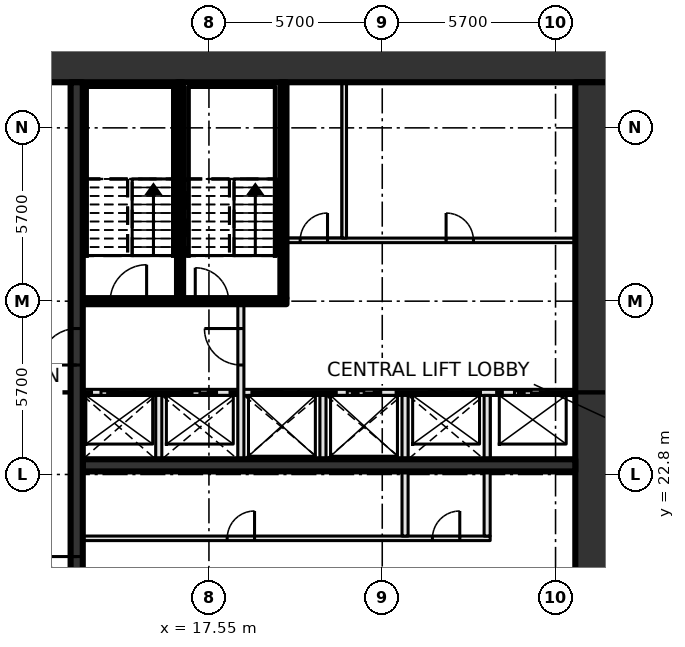
"""IFC4 building model, lengths in metres.
Left out: names, types, materials, properties, quantities, classifications, styles, units other than length and angle.
Written with IfcOpenShell. Run it as: python <this file> out.ifc"""

import sys

from ifc_helpers import new_model, si_unit, direction, frame, frame_2d, origin, place, context, subcontext, project, spatial, rectangle, extrude, element, fill, save


model = new_model("IFC4")
c1 = context("Model", 3, precision=1e-05, world=origin(), true_north=direction((0.0, 1.0)))
c2 = subcontext(c1, "Body", "Model", "MODEL_VIEW")
j1 = project(units=[si_unit("LENGTHUNIT", "METRE"), si_unit("PLANEANGLEUNIT", "RADIAN")], contexts=[c1])
p1 = place(None, origin())
s1 = spatial("IfcSite", under=j1, at=p1, CompositionType="ELEMENT")
p2 = place(p1, origin())
s2 = spatial("IfcBuilding", under=s1, at=p2, CompositionType="ELEMENT")
p3 = place(p2, origin())
s3 = spatial("IfcBuildingStorey", under=s2, at=p3, CompositionType="ELEMENT", Elevation=0.0)
p4 = place(p3, frame((8.0, 36.3, -0.45), z_axis=(0.0, 0.0, 1.0), x_axis=(1.0, 0.0, 0.0)))
e1 = element("IfcWall", 1, at=p4, inside=s3, PredefinedType="SHEAR", context=c2, shape_type="SweptSolid", body=[
    extrude(rectangle(XDim=22.8, YDim=1.2, at=frame_2d((11.4, 0.0))), origin(), (0.0, 0.0, 1.0), 7.2),
])
p5 = place(p4, frame((2.3, 0.0, 0.45)))
e2 = element("IfcOpeningElement", 2, at=p5, cuts=e1, PredefinedType="OPENING", context=c2, shape_type="SweptSolid", body=[
    extrude(rectangle(XDim=1.8, YDim=2.1, at=frame_2d((0.9, 1.05))), frame((0.0, 0.61, 0.0), z_axis=(0.0, -1.0, 0.0), x_axis=(1.0, 0.0, 0.0)), (0.0, 0.0, 1.0), 1.22),
])
p6 = place(p3, frame((30.2, 15.3, -0.45), z_axis=(0.0, 0.0, 1.0), x_axis=(0.0, 1.0, 0.0)))
e3 = element("IfcWall", 3, at=p6, inside=s3, PredefinedType="SHEAR", context=c2, shape_type="SweptSolid", body=[
    extrude(rectangle(XDim=20.4, YDim=1.2, at=frame_2d((10.2, 0.0))), origin(), (0.0, 0.0, 1.0), 7.2),
])
p7 = place(p3, frame((13.4, 20.7, 0.0), z_axis=(0.0, 0.0, 1.0), x_axis=(1.0, 0.0, 0.0)))
e4 = element("IfcWall", 4, at=p7, inside=s3, PredefinedType="PARTITIONING", context=c2, shape_type="SweptSolid", body=[
    extrude(rectangle(XDim=13.4, YDim=0.15, at=frame_2d((6.7, 0.0))), origin(), (0.0, 0.0, 1.0), 6.75),
])
p8 = place(p7, frame((4.75, 0.0, 0.0)))
e5 = element("IfcOpeningElement", 5, at=p8, cuts=e4, PredefinedType="OPENING", context=c2, shape_type="SweptSolid", body=[
    extrude(rectangle(XDim=0.9, YDim=2.1, at=frame_2d((0.45, 1.05))), frame((0.0, 0.085, 0.0), z_axis=(0.0, -1.0, 0.0), x_axis=(1.0, 0.0, 0.0)), (0.0, 0.0, 1.0), 0.17),
])
p9 = place(p7, frame((11.5, 0.0, 0.0)))
e6 = element("IfcOpeningElement", 6, at=p9, cuts=e4, PredefinedType="OPENING", context=c2, shape_type="SweptSolid", body=[
    extrude(rectangle(XDim=0.9, YDim=2.1, at=frame_2d((0.45, 1.05))), frame((0.0, 0.085, 0.0), z_axis=(0.0, -1.0, 0.0), x_axis=(1.0, 0.0, 0.0)), (0.0, 0.0, 1.0), 0.17),
])
p10 = place(p3, frame((13.4, 23.1, 0.0), z_axis=(0.0, 0.0, 1.0), x_axis=(1.0, 0.0, 0.0)))
e7 = element("IfcWall", 7, at=p10, inside=s3, PredefinedType="SHEAR", context=c2, shape_type="SweptSolid", body=[
    extrude(rectangle(XDim=16.2, YDim=0.4, at=frame_2d((8.1, 0.0))), origin(), (0.0, 0.0, 1.0), 6.75),
])
p11 = place(p3, frame((13.4, 25.5, 0.0), z_axis=(0.0, 0.0, 1.0), x_axis=(1.0, 0.0, 0.0)))
e8 = element("IfcWall", 8, at=p11, inside=s3, PredefinedType="SOLIDWALL", context=c2, shape_type="SweptSolid", body=[
    extrude(rectangle(XDim=16.2, YDim=0.2, at=frame_2d((8.1, 0.0))), origin(), (0.0, 0.0, 1.0), 6.75),
])
p12 = place(p11, frame((0.6, 0.0, 0.0)))
e9 = element("IfcOpeningElement", 9, at=p12, cuts=e8, PredefinedType="OPENING", context=c2, shape_type="SweptSolid", body=[
    extrude(rectangle(XDim=1.1, YDim=2.1, at=frame_2d((0.55, 1.05))), frame((0.0, 0.11, 0.0), z_axis=(0.0, -1.0, 0.0), x_axis=(1.0, 0.0, 0.0)), (0.0, 0.0, 1.0), 0.22),
])
p13 = place(p11, frame((3.3, 0.0, 0.0)))
e10 = element("IfcOpeningElement", 10, at=p13, cuts=e8, PredefinedType="OPENING", context=c2, shape_type="SweptSolid", body=[
    extrude(rectangle(XDim=1.1, YDim=2.1, at=frame_2d((0.55, 1.05))), frame((0.0, 0.11, 0.0), z_axis=(0.0, -1.0, 0.0), x_axis=(1.0, 0.0, 0.0)), (0.0, 0.0, 1.0), 0.22),
])
p14 = place(p11, frame((6.0, 0.0, 0.0)))
e11 = element("IfcOpeningElement", 11, at=p14, cuts=e8, PredefinedType="OPENING", context=c2, shape_type="SweptSolid", body=[
    extrude(rectangle(XDim=1.1, YDim=2.1, at=frame_2d((0.55, 1.05))), frame((0.0, 0.11, 0.0), z_axis=(0.0, -1.0, 0.0), x_axis=(1.0, 0.0, 0.0)), (0.0, 0.0, 1.0), 0.22),
])
p15 = place(p11, frame((8.7, 0.0, 0.0)))
e12 = element("IfcOpeningElement", 12, at=p15, cuts=e8, PredefinedType="OPENING", context=c2, shape_type="SweptSolid", body=[
    extrude(rectangle(XDim=1.1, YDim=2.1, at=frame_2d((0.55, 1.05))), frame((0.0, 0.11, 0.0), z_axis=(0.0, -1.0, 0.0), x_axis=(1.0, 0.0, 0.0)), (0.0, 0.0, 1.0), 0.22),
])
p16 = place(p11, frame((11.4, 0.0, 0.0)))
e13 = element("IfcOpeningElement", 13, at=p16, cuts=e8, PredefinedType="OPENING", context=c2, shape_type="SweptSolid", body=[
    extrude(rectangle(XDim=1.1, YDim=2.1, at=frame_2d((0.55, 1.05))), frame((0.0, 0.11, 0.0), z_axis=(0.0, -1.0, 0.0), x_axis=(1.0, 0.0, 0.0)), (0.0, 0.0, 1.0), 0.22),
])
p17 = place(p11, frame((14.2, 0.0, 0.0)))
e14 = element("IfcOpeningElement", 14, at=p17, cuts=e8, PredefinedType="OPENING", context=c2, shape_type="SweptSolid", body=[
    extrude(rectangle(XDim=1.1, YDim=2.1, at=frame_2d((0.55, 1.05))), frame((0.0, 0.11, 0.0), z_axis=(0.0, -1.0, 0.0), x_axis=(1.0, 0.0, 0.0)), (0.0, 0.0, 1.0), 0.22),
])
p18 = place(p3, frame((13.4, 28.5, 0.0), z_axis=(0.0, 0.0, 1.0), x_axis=(1.0, 0.0, 0.0)))
e15 = element("IfcWall", 15, at=p18, inside=s3, PredefinedType="SOLIDWALL", context=c2, shape_type="SweptSolid", body=[
    extrude(rectangle(XDim=6.7, YDim=0.2, at=frame_2d((3.35, 0.0))), origin(), (0.0, 0.0, 1.0), 6.75),
])
p19 = place(p18, frame((0.9, 0.0, 0.0)))
e16 = element("IfcOpeningElement", 16, at=p19, cuts=e15, PredefinedType="OPENING", context=c2, shape_type="SweptSolid", body=[
    extrude(rectangle(XDim=1.2, YDim=2.1, at=frame_2d((0.6, 1.05))), frame((0.0, 0.11, 0.0), z_axis=(0.0, -1.0, 0.0), x_axis=(1.0, 0.0, 0.0)), (0.0, 0.0, 1.0), 0.22),
])
p20 = place(p18, frame((3.7, 0.0, 0.0)))
e17 = element("IfcOpeningElement", 17, at=p20, cuts=e15, PredefinedType="OPENING", context=c2, shape_type="SweptSolid", body=[
    extrude(rectangle(XDim=1.1, YDim=2.1, at=frame_2d((0.55, 1.05))), frame((0.0, 0.11, 0.0), z_axis=(0.0, -1.0, 0.0), x_axis=(1.0, 0.0, 0.0)), (0.0, 0.0, 1.0), 0.22),
])
p21 = place(p3, frame((20.1, 30.5, 0.0), z_axis=(0.0, 0.0, 1.0), x_axis=(1.0, 0.0, 0.0)))
e18 = element("IfcWall", 18, at=p21, inside=s3, PredefinedType="PARTITIONING", context=c2, shape_type="SweptSolid", body=[
    extrude(rectangle(XDim=9.5, YDim=0.15, at=frame_2d((4.75, 0.0))), origin(), (0.0, 0.0, 1.0), 6.75),
])
p22 = place(p21, frame((0.45, 0.0, 0.0)))
e19 = element("IfcOpeningElement", 19, at=p22, cuts=e18, PredefinedType="OPENING", context=c2, shape_type="SweptSolid", body=[
    extrude(rectangle(XDim=0.9, YDim=2.1, at=frame_2d((0.45, 1.05))), frame((0.0, 0.085, 0.0), z_axis=(0.0, -1.0, 0.0), x_axis=(1.0, 0.0, 0.0)), (0.0, 0.0, 1.0), 0.17),
])
p23 = place(p21, frame((5.25, 0.0, 0.0)))
e20 = element("IfcOpeningElement", 20, at=p23, cuts=e18, PredefinedType="OPENING", context=c2, shape_type="SweptSolid", body=[
    extrude(rectangle(XDim=0.9, YDim=2.1, at=frame_2d((0.45, 1.05))), frame((0.0, 0.085, 0.0), z_axis=(0.0, -1.0, 0.0), x_axis=(1.0, 0.0, 0.0)), (0.0, 0.0, 1.0), 0.17),
])
p24 = place(p3, frame((13.2, 15.3, 0.0), z_axis=(0.0, 0.0, 1.0), x_axis=(0.0, 1.0, 0.0)))
e21 = element("IfcWall", 21, at=p24, inside=s3, PredefinedType="SHEAR", context=c2, shape_type="SweptSolid", body=[
    extrude(rectangle(XDim=20.4, YDim=0.4, at=frame_2d((10.2, 0.0))), origin(), (0.0, 0.0, 1.0), 6.75),
])
p25 = place(p24, frame((3.0, 0.0, 0.0)))
e22 = element("IfcOpeningElement", 22, at=p25, cuts=e21, PredefinedType="OPENING", context=c2, shape_type="SweptSolid", body=[
    extrude(rectangle(XDim=1.8, YDim=2.1, at=frame_2d((0.9, 1.05))), frame((0.0, 0.21, 0.0), z_axis=(0.0, -1.0, 0.0), x_axis=(1.0, 0.0, 0.0)), (0.0, 0.0, 1.0), 0.42),
])
p26 = place(p24, frame((11.1, 0.0, 0.0)))
e23 = element("IfcOpeningElement", 23, at=p26, cuts=e21, PredefinedType="OPENING", context=c2, shape_type="SweptSolid", body=[
    extrude(rectangle(XDim=1.2, YDim=2.1, at=frame_2d((0.6, 1.05))), frame((0.0, 0.21, 0.0), z_axis=(0.0, -1.0, 0.0), x_axis=(1.0, 0.0, 0.0)), (0.0, 0.0, 1.0), 0.42),
])
p27 = place(p3, frame((15.9, 23.3, 0.0), z_axis=(0.0, 0.0, 1.0), x_axis=(0.0, 1.0, 0.0)))
e24 = element("IfcWall", 24, at=p27, inside=s3, PredefinedType="SOLIDWALL", context=c2, shape_type="SweptSolid", body=[
    extrude(rectangle(XDim=2.1, YDim=0.2, at=frame_2d((1.05, 0.0))), origin(), (0.0, 0.0, 1.0), 6.75),
])
p28 = place(p3, frame((16.6, 28.6, 0.0), z_axis=(0.0, 0.0, 1.0), x_axis=(0.0, 1.0, 0.0)))
e25 = element("IfcWall", 25, at=p28, inside=s3, PredefinedType="SOLIDWALL", context=c2, shape_type="SweptSolid", body=[
    extrude(rectangle(XDim=7.1, YDim=0.2, at=frame_2d((3.55, 0.0))), origin(), (0.0, 0.0, 1.0), 6.75),
])
p29 = place(p3, frame((18.6, 23.3, 0.0), z_axis=(0.0, 0.0, 1.0), x_axis=(0.0, 1.0, 0.0)))
e26 = element("IfcWall", 26, at=p29, inside=s3, PredefinedType="SOLIDWALL", context=c2, shape_type="SweptSolid", body=[
    extrude(rectangle(XDim=5.1, YDim=0.2, at=frame_2d((2.55, 0.0))), origin(), (0.0, 0.0, 1.0), 6.75),
])
p30 = place(p29, frame((3.1, 0.0, 0.0)))
e27 = element("IfcOpeningElement", 27, at=p30, cuts=e26, PredefinedType="OPENING", context=c2, shape_type="SweptSolid", body=[
    extrude(rectangle(XDim=1.2, YDim=2.1, at=frame_2d((0.6, 1.05))), frame((0.0, 0.11, 0.0), z_axis=(0.0, -1.0, 0.0), x_axis=(1.0, 0.0, 0.0)), (0.0, 0.0, 1.0), 0.22),
])
p31 = place(p3, frame((20.0, 28.6, 0.0), z_axis=(0.0, 0.0, 1.0), x_axis=(0.0, 1.0, 0.0)))
e28 = element("IfcWall", 28, at=p31, inside=s3, PredefinedType="SOLIDWALL", context=c2, shape_type="SweptSolid", body=[
    extrude(rectangle(XDim=7.1, YDim=0.2, at=frame_2d((3.55, 0.0))), origin(), (0.0, 0.0, 1.0), 6.75),
])
p32 = place(p3, frame((21.3, 23.3, 0.0), z_axis=(0.0, 0.0, 1.0), x_axis=(0.0, 1.0, 0.0)))
e29 = element("IfcWall", 29, at=p32, inside=s3, PredefinedType="SOLIDWALL", context=c2, shape_type="SweptSolid", body=[
    extrude(rectangle(XDim=2.1, YDim=0.2, at=frame_2d((1.05, 0.0))), origin(), (0.0, 0.0, 1.0), 6.75),
])
p33 = place(p3, frame((22.0, 30.575, 0.0), z_axis=(0.0, 0.0, 1.0), x_axis=(0.0, 1.0, 0.0)))
e30 = element("IfcWall", 30, at=p33, inside=s3, PredefinedType="PARTITIONING", context=c2, shape_type="SweptSolid", body=[
    extrude(rectangle(XDim=5.125, YDim=0.15, at=frame_2d((2.562, 0.0))), origin(), (0.0, 0.0, 1.0), 6.75),
])
for number, where, z_axis, x_axis in (
    (31, (24.0, 20.775, 0.0), (0.0, 0.0, 1.0), (0.0, 1.0, 0.0)),
    (32, (26.7, 20.775, 0.0), (0.0, 0.0, 1.0), (0.0, 1.0, 0.0)),
):
    element("IfcWall", number, at=place(p3, frame(where, z_axis=z_axis, x_axis=x_axis)), inside=s3, PredefinedType="SOLIDWALL", context=c2, shape_type="SweptSolid", body=[
        extrude(rectangle(XDim=4.625, YDim=0.2, at=frame_2d((2.312, 0.0))), origin(), (0.0, 0.0, 1.0), 6.75),
    ])
p34 = place(p12, origin())
e33 = element("IfcDoor", 33, at=p34, inside=s3, OperationType="SLIDING_TO_LEFT", PredefinedType="DOOR", context=c2, shape_type="SweptSolid", body=[
    extrude(rectangle(XDim=1.1, YDim=2.1, at=frame_2d((0.55, 1.05))), frame((0.0, 0.025, 0.0), z_axis=(0.0, -1.0, 0.0), x_axis=(1.0, 0.0, 0.0)), (0.0, 0.0, 1.0), 0.05),
])
fill(e9, e33)
p35 = place(p13, origin())
e34 = element("IfcDoor", 34, at=p35, inside=s3, OperationType="SLIDING_TO_LEFT", PredefinedType="DOOR", context=c2, shape_type="SweptSolid", body=[
    extrude(rectangle(XDim=1.1, YDim=2.1, at=frame_2d((0.55, 1.05))), frame((0.0, 0.025, 0.0), z_axis=(0.0, -1.0, 0.0), x_axis=(1.0, 0.0, 0.0)), (0.0, 0.0, 1.0), 0.05),
])
fill(e10, e34)
p36 = place(p14, origin())
e35 = element("IfcDoor", 35, at=p36, inside=s3, OperationType="SLIDING_TO_LEFT", PredefinedType="DOOR", context=c2, shape_type="SweptSolid", body=[
    extrude(rectangle(XDim=1.1, YDim=2.1, at=frame_2d((0.55, 1.05))), frame((0.0, 0.025, 0.0), z_axis=(0.0, -1.0, 0.0), x_axis=(1.0, 0.0, 0.0)), (0.0, 0.0, 1.0), 0.05),
])
fill(e11, e35)
p37 = place(p15, origin())
e36 = element("IfcDoor", 36, at=p37, inside=s3, OperationType="SLIDING_TO_LEFT", PredefinedType="DOOR", context=c2, shape_type="SweptSolid", body=[
    extrude(rectangle(XDim=1.1, YDim=2.1, at=frame_2d((0.55, 1.05))), frame((0.0, 0.025, 0.0), z_axis=(0.0, -1.0, 0.0), x_axis=(1.0, 0.0, 0.0)), (0.0, 0.0, 1.0), 0.05),
])
fill(e12, e36)
p38 = place(p16, origin())
e37 = element("IfcDoor", 37, at=p38, inside=s3, OperationType="SLIDING_TO_LEFT", PredefinedType="DOOR", context=c2, shape_type="SweptSolid", body=[
    extrude(rectangle(XDim=1.1, YDim=2.1, at=frame_2d((0.55, 1.05))), frame((0.0, 0.025, 0.0), z_axis=(0.0, -1.0, 0.0), x_axis=(1.0, 0.0, 0.0)), (0.0, 0.0, 1.0), 0.05),
])
fill(e13, e37)
p39 = place(p17, origin())
e38 = element("IfcDoor", 38, at=p39, inside=s3, OperationType="SLIDING_TO_LEFT", PredefinedType="DOOR", context=c2, shape_type="SweptSolid", body=[
    extrude(rectangle(XDim=1.1, YDim=2.1, at=frame_2d((0.55, 1.05))), frame((0.0, 0.025, 0.0), z_axis=(0.0, -1.0, 0.0), x_axis=(1.0, 0.0, 0.0)), (0.0, 0.0, 1.0), 0.05),
])
fill(e14, e38)
p40 = place(p8, origin())
e39 = element("IfcDoor", 39, at=p40, inside=s3, OperationType="SINGLE_SWING_RIGHT", PredefinedType="DOOR", context=c2, shape_type="SweptSolid", body=[
    extrude(rectangle(XDim=0.9, YDim=2.1, at=frame_2d((0.45, 1.05))), frame((0.0, 0.025, 0.0), z_axis=(0.0, -1.0, 0.0), x_axis=(1.0, 0.0, 0.0)), (0.0, 0.0, 1.0), 0.05),
])
fill(e5, e39)
p41 = place(p9, origin())
e40 = element("IfcDoor", 40, at=p41, inside=s3, OperationType="SINGLE_SWING_RIGHT", PredefinedType="DOOR", context=c2, shape_type="SweptSolid", body=[
    extrude(rectangle(XDim=0.9, YDim=2.1, at=frame_2d((0.45, 1.05))), frame((0.0, 0.025, 0.0), z_axis=(0.0, -1.0, 0.0), x_axis=(1.0, 0.0, 0.0)), (0.0, 0.0, 1.0), 0.05),
])
fill(e6, e40)
p42 = place(p22, origin())
e41 = element("IfcDoor", 41, at=p42, inside=s3, OperationType="SINGLE_SWING_RIGHT", PredefinedType="DOOR", context=c2, shape_type="SweptSolid", body=[
    extrude(rectangle(XDim=0.9, YDim=2.1, at=frame_2d((0.45, 1.05))), frame((0.0, 0.025, 0.0), z_axis=(0.0, -1.0, 0.0), x_axis=(1.0, 0.0, 0.0)), (0.0, 0.0, 1.0), 0.05),
])
fill(e19, e41)
p43 = place(p23, origin())
e42 = element("IfcDoor", 42, at=p43, inside=s3, OperationType="SINGLE_SWING_LEFT", PredefinedType="DOOR", context=c2, shape_type="SweptSolid", body=[
    extrude(rectangle(XDim=0.9, YDim=2.1, at=frame_2d((0.45, 1.05))), frame((0.0, 0.025, 0.0), z_axis=(0.0, -1.0, 0.0), x_axis=(1.0, 0.0, 0.0)), (0.0, 0.0, 1.0), 0.05),
])
fill(e20, e42)
p44 = place(p19, origin())
e43 = element("IfcDoor", 43, at=p44, inside=s3, OperationType="SINGLE_SWING_RIGHT", PredefinedType="DOOR", context=c2, shape_type="SweptSolid", body=[
    extrude(rectangle(XDim=1.2, YDim=2.1, at=frame_2d((0.6, 1.05))), frame((0.0, 0.025, 0.0), z_axis=(0.0, -1.0, 0.0), x_axis=(1.0, 0.0, 0.0)), (0.0, 0.0, 1.0), 0.05),
])
fill(e16, e43)
p45 = place(p20, origin())
e44 = element("IfcDoor", 44, at=p45, inside=s3, OperationType="SINGLE_SWING_LEFT", PredefinedType="DOOR", context=c2, shape_type="SweptSolid", body=[
    extrude(rectangle(XDim=1.1, YDim=2.1, at=frame_2d((0.55, 1.05))), frame((0.0, 0.025, 0.0), z_axis=(0.0, -1.0, 0.0), x_axis=(1.0, 0.0, 0.0)), (0.0, 0.0, 1.0), 0.05),
])
fill(e17, e44)
p46 = place(p25, origin())
e45 = element("IfcDoor", 45, at=p46, inside=s3, OperationType="DOUBLE_DOOR_SINGLE_SWING", PredefinedType="DOOR", context=c2, shape_type="SweptSolid", body=[
    extrude(rectangle(XDim=1.8, YDim=2.1, at=frame_2d((0.9, 1.05))), frame((0.0, 0.025, 0.0), z_axis=(0.0, -1.0, 0.0), x_axis=(1.0, 0.0, 0.0)), (0.0, 0.0, 1.0), 0.05),
])
fill(e22, e45)
p47 = place(p26, origin())
e46 = element("IfcDoor", 46, at=p47, inside=s3, OperationType="SINGLE_SWING_LEFT", PredefinedType="DOOR", context=c2, shape_type="SweptSolid", body=[
    extrude(rectangle(XDim=1.2, YDim=2.1, at=frame_2d((0.6, 1.05))), frame((0.0, 0.025, 0.0), z_axis=(0.0, -1.0, 0.0), x_axis=(1.0, 0.0, 0.0)), (0.0, 0.0, 1.0), 0.05),
])
fill(e23, e46)
p48 = place(p30, origin())
e47 = element("IfcDoor", 47, at=p48, inside=s3, OperationType="SINGLE_SWING_RIGHT", PredefinedType="DOOR", context=c2, shape_type="SweptSolid", body=[
    extrude(rectangle(XDim=1.2, YDim=2.1, at=frame_2d((0.6, 1.05))), frame((0.0, 0.025, 0.0), z_axis=(0.0, -1.0, 0.0), x_axis=(1.0, 0.0, 0.0)), (0.0, 0.0, 1.0), 0.05),
])
fill(e27, e47)
save(model, sys.argv[1])
